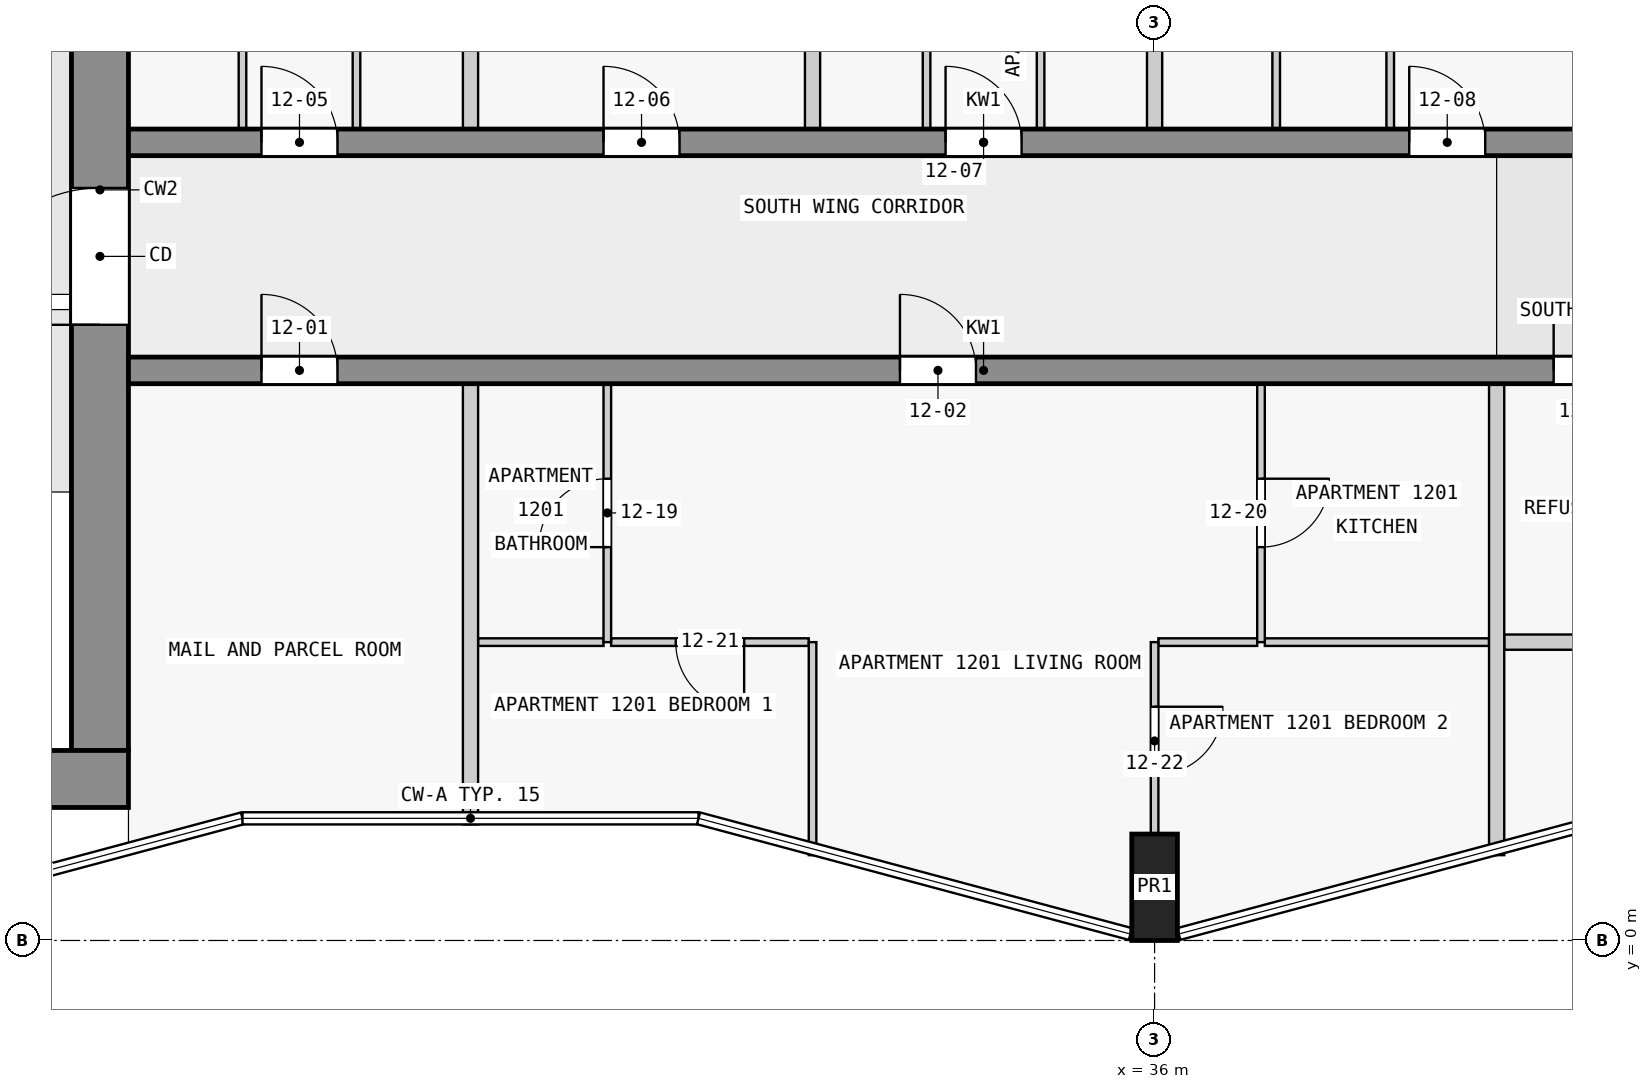
"""IFC4 building model, lengths in metres.
Left out: names, types, materials, properties, quantities, classifications, styles, units other than length and angle.
Written with IfcOpenShell. Run it as: python <this file> out.ifc"""

import sys

from ifc_helpers import new_model, si_unit, direction, frame, frame_2d, origin, origin_2d, place, context, subcontext, project, spatial, rectangle, extrude, element, fill, save


model = new_model("IFC4")
c1 = context("Model", 3, precision=1e-05, world=origin(), true_north=direction((0.0, 1.0)))
c2 = subcontext(c1, "Body", "Model", "MODEL_VIEW")
j1 = project(units=[si_unit("LENGTHUNIT", "METRE"), si_unit("PLANEANGLEUNIT", "RADIAN")], contexts=[c1])
p1 = place(None, origin())
s1 = spatial("IfcSite", under=j1, at=p1, CompositionType="ELEMENT")
p2 = place(p1, origin())
s2 = spatial("IfcBuilding", under=s1, at=p2, CompositionType="ELEMENT")
p3 = place(p2, frame((0.0, 0.0, 51.3)))
s3 = spatial("IfcBuildingStorey", under=s2, at=p3, CompositionType="ELEMENT", Elevation=51.3)
p4 = place(p3, frame((36.0, 0.7, 0.0), z_axis=(0.0, 0.0, 1.0), x_axis=(1.0, 0.0, 0.0)))
e1 = element("IfcColumn", 1, at=p4, inside=s3, PredefinedType="COLUMN", context=c2, shape_type="SweptSolid", body=[
    extrude(rectangle(XDim=0.6, YDim=1.4, at=origin_2d()), origin(), (0.0, 0.0, 1.0), 3.5),
])
p5 = place(p3, frame((1.55, 2.125, 0.0), z_axis=(0.0, 0.0, 1.0), x_axis=(1.0, 0.0, 0.0)))
e2 = element("IfcWall", 2, at=p5, inside=s3, PredefinedType="SHEAR", context=c2, shape_type="SweptSolid", body=[
    extrude(rectangle(XDim=20.95, YDim=0.75, at=frame_2d((10.475, 0.0))), origin(), (0.0, 0.0, 1.0), 3.25),
])
p6 = place(p3, frame((22.125, 2.5, 0.0), z_axis=(0.0, 0.0, 1.0), x_axis=(0.0, 1.0, 0.0)))
e3 = element("IfcWall", 3, at=p6, inside=s3, PredefinedType="SHEAR", context=c2, shape_type="SweptSolid", body=[
    extrude(rectangle(XDim=14.75, YDim=0.75, at=frame_2d((7.375, 0.0))), origin(), (0.0, 0.0, 1.0), 3.25),
])
p7 = place(p6, frame((5.6, 0.0, 0.0)))
e4 = element("IfcOpeningElement", 4, at=p7, cuts=e3, PredefinedType="OPENING", context=c2, shape_type="SweptSolid", body=[
    extrude(rectangle(XDim=1.8, YDim=2.1, at=frame_2d((0.9, 1.05))), frame((0.0, 0.385, 0.0), z_axis=(0.0, -1.0, 0.0), x_axis=(1.0, 0.0, 0.0)), (0.0, 0.0, 1.0), 0.77),
])
p8 = place(p3, frame((22.5, 7.5, 0.0), z_axis=(0.0, 0.0, 1.0), x_axis=(1.0, 0.0, 0.0)))
e5 = element("IfcWall", 5, at=p8, inside=s3, PredefinedType="SHEAR", context=c2, shape_type="SweptSolid", body=[
    extrude(rectangle(XDim=22.5, YDim=0.35, at=frame_2d((11.25, 0.0))), origin(), (0.0, 0.0, 1.0), 3.25),
])
p9 = place(p8, frame((1.75, 0.0, 0.0)))
e6 = element("IfcOpeningElement", 6, at=p9, cuts=e5, PredefinedType="OPENING", context=c2, shape_type="SweptSolid", body=[
    extrude(rectangle(XDim=1.0, YDim=2.1, at=frame_2d((0.5, 1.05))), frame((0.0, 0.185, 0.0), z_axis=(0.0, -1.0, 0.0), x_axis=(1.0, 0.0, 0.0)), (0.0, 0.0, 1.0), 0.37),
])
p10 = place(p8, frame((10.15, 0.0, 0.0)))
e7 = element("IfcOpeningElement", 7, at=p10, cuts=e5, PredefinedType="OPENING", context=c2, shape_type="SweptSolid", body=[
    extrude(rectangle(XDim=1.0, YDim=2.1, at=frame_2d((0.5, 1.05))), frame((0.0, 0.185, 0.0), z_axis=(0.0, -1.0, 0.0), x_axis=(1.0, 0.0, 0.0)), (0.0, 0.0, 1.0), 0.37),
])
p11 = place(p8, frame((18.75, 0.0, 0.0)))
e8 = element("IfcOpeningElement", 8, at=p11, cuts=e5, PredefinedType="OPENING", context=c2, shape_type="SweptSolid", body=[
    extrude(rectangle(XDim=0.9, YDim=2.1, at=frame_2d((0.45, 1.05))), frame((0.0, 0.185, 0.0), z_axis=(0.0, -1.0, 0.0), x_axis=(1.0, 0.0, 0.0)), (0.0, 0.0, 1.0), 0.37),
])
p12 = place(p8, frame((20.95, 0.0, 0.0)))
e9 = element("IfcOpeningElement", 9, at=p12, cuts=e5, PredefinedType="OPENING", context=c2, shape_type="SweptSolid", body=[
    extrude(rectangle(XDim=1.0, YDim=2.1, at=frame_2d((0.5, 1.05))), frame((0.0, 0.185, 0.0), z_axis=(0.0, -1.0, 0.0), x_axis=(1.0, 0.0, 0.0)), (0.0, 0.0, 1.0), 0.37),
])
p13 = place(p3, frame((22.5, 10.5, 0.0), z_axis=(0.0, 0.0, 1.0), x_axis=(1.0, 0.0, 0.0)))
e10 = element("IfcWall", 10, at=p13, inside=s3, PredefinedType="SHEAR", context=c2, shape_type="SweptSolid", body=[
    extrude(rectangle(XDim=22.5, YDim=0.35, at=frame_2d((11.25, 0.0))), origin(), (0.0, 0.0, 1.0), 3.25),
])
p14 = place(p13, frame((1.75, 0.0, 0.0)))
e11 = element("IfcOpeningElement", 11, at=p14, cuts=e10, PredefinedType="OPENING", context=c2, shape_type="SweptSolid", body=[
    extrude(rectangle(XDim=1.0, YDim=2.1, at=frame_2d((0.5, 1.05))), frame((0.0, 0.185, 0.0), z_axis=(0.0, -1.0, 0.0), x_axis=(1.0, 0.0, 0.0)), (0.0, 0.0, 1.0), 0.37),
])
p15 = place(p13, frame((6.25, 0.0, 0.0)))
e12 = element("IfcOpeningElement", 12, at=p15, cuts=e10, PredefinedType="OPENING", context=c2, shape_type="SweptSolid", body=[
    extrude(rectangle(XDim=1.0, YDim=2.1, at=frame_2d((0.5, 1.05))), frame((0.0, 0.185, 0.0), z_axis=(0.0, -1.0, 0.0), x_axis=(1.0, 0.0, 0.0)), (0.0, 0.0, 1.0), 0.37),
])
p16 = place(p13, frame((10.75, 0.0, 0.0)))
e13 = element("IfcOpeningElement", 13, at=p16, cuts=e10, PredefinedType="OPENING", context=c2, shape_type="SweptSolid", body=[
    extrude(rectangle(XDim=1.0, YDim=2.1, at=frame_2d((0.5, 1.05))), frame((0.0, 0.185, 0.0), z_axis=(0.0, -1.0, 0.0), x_axis=(1.0, 0.0, 0.0)), (0.0, 0.0, 1.0), 0.37),
])
p17 = place(p13, frame((16.85, 0.0, 0.0)))
e14 = element("IfcOpeningElement", 14, at=p17, cuts=e10, PredefinedType="OPENING", context=c2, shape_type="SweptSolid", body=[
    extrude(rectangle(XDim=1.0, YDim=2.1, at=frame_2d((0.5, 1.05))), frame((0.0, 0.185, 0.0), z_axis=(0.0, -1.0, 0.0), x_axis=(1.0, 0.0, 0.0)), (0.0, 0.0, 1.0), 0.37),
])
p18 = place(p3, frame((31.45, 3.925, 0.0), z_axis=(0.0, 0.0, 1.0), x_axis=(-1.0, 0.0, 0.0)))
e15 = element("IfcWall", 15, at=p18, inside=s3, PredefinedType="PARTITIONING", context=c2, shape_type="SweptSolid", body=[
    extrude(rectangle(XDim=2.6, YDim=0.1, at=frame_2d((1.3, 0.0))), origin(), (0.0, 0.0, 1.0), 3.25),
])
p19 = place(p18, frame((0.85, 0.0, 0.0)))
e16 = element("IfcOpeningElement", 16, at=p19, cuts=e15, PredefinedType="OPENING", context=c2, shape_type="SweptSolid", body=[
    extrude(rectangle(XDim=0.9, YDim=2.1, at=frame_2d((0.45, 1.05))), frame((0.0, 0.06, 0.0), z_axis=(0.0, -1.0, 0.0), x_axis=(1.0, 0.0, 0.0)), (0.0, 0.0, 1.0), 0.12),
])
p20 = place(p3, frame((37.35, 3.925, 0.0), z_axis=(0.0, 0.0, 1.0), x_axis=(-1.0, 0.0, 0.0)))
e17 = element("IfcWall", 17, at=p20, inside=s3, PredefinedType="PARTITIONING", context=c2, shape_type="SweptSolid", body=[
    extrude(rectangle(XDim=1.3, YDim=0.1, at=frame_2d((0.65, 0.0))), origin(), (0.0, 0.0, 1.0), 3.25),
])
p21 = place(p3, frame((27.1, 3.925, 0.0), z_axis=(0.0, 0.0, 1.0), x_axis=(1.0, 0.0, 0.0)))
e18 = element("IfcWall", 18, at=p21, inside=s3, PredefinedType="PARTITIONING", context=c2, shape_type="SweptSolid", body=[
    extrude(rectangle(XDim=1.65, YDim=0.1, at=frame_2d((0.825, 0.0))), origin(), (0.0, 0.0, 1.0), 3.25),
])
p22 = place(p3, frame((37.45, 3.925, 0.0), z_axis=(0.0, 0.0, 1.0), x_axis=(1.0, 0.0, 0.0)))
e19 = element("IfcWall", 19, at=p22, inside=s3, PredefinedType="PARTITIONING", context=c2, shape_type="SweptSolid", body=[
    extrude(rectangle(XDim=2.95, YDim=0.1, at=frame_2d((1.475, 0.0))), origin(), (0.0, 0.0, 1.0), 3.25),
])
p23 = place(p3, frame((40.6, 3.925, 0.0), z_axis=(0.0, 0.0, 1.0), x_axis=(1.0, 0.0, 0.0)))
e20 = element("IfcWall", 20, at=p23, inside=s3, PredefinedType="PARTITIONING", context=c2, shape_type="SweptSolid", body=[
    extrude(rectangle(XDim=2.2, YDim=0.2, at=frame_2d((1.1, 0.0))), origin(), (0.0, 0.0, 1.0), 3.25),
])
p24 = place(p3, frame((24.0, 10.675, 0.0), z_axis=(0.0, 0.0, 1.0), x_axis=(0.0, 1.0, 0.0)))
e21 = element("IfcWall", 21, at=p24, inside=s3, PredefinedType="PARTITIONING", context=c2, shape_type="SweptSolid", body=[
    extrude(rectangle(XDim=3.4, YDim=0.1, at=frame_2d((1.7, 0.0))), origin(), (0.0, 0.0, 1.0), 3.25),
])
p25 = place(p24, frame((1.25, 0.0, 0.0)))
e22 = element("IfcOpeningElement", 22, at=p25, cuts=e21, PredefinedType="OPENING", context=c2, shape_type="SweptSolid", body=[
    extrude(rectangle(XDim=0.9, YDim=2.1, at=frame_2d((0.45, 1.05))), frame((0.0, 0.06, 0.0), z_axis=(0.0, -1.0, 0.0), x_axis=(1.0, 0.0, 0.0)), (0.0, 0.0, 1.0), 0.12),
])
p26 = place(p3, frame((25.5, 14.075, 0.0), z_axis=(0.0, 0.0, 1.0), x_axis=(0.0, -1.0, 0.0)))
e23 = element("IfcWall", 23, at=p26, inside=s3, PredefinedType="PARTITIONING", context=c2, shape_type="SweptSolid", body=[
    extrude(rectangle(XDim=3.4, YDim=0.1, at=frame_2d((1.7, 0.0))), origin(), (0.0, 0.0, 1.0), 3.25),
])
p27 = place(p26, frame((1.25, 0.0, 0.0)))
e24 = element("IfcOpeningElement", 24, at=p27, cuts=e23, PredefinedType="OPENING", context=c2, shape_type="SweptSolid", body=[
    extrude(rectangle(XDim=0.9, YDim=2.1, at=frame_2d((0.45, 1.05))), frame((0.0, 0.06, 0.0), z_axis=(0.0, -1.0, 0.0), x_axis=(1.0, 0.0, 0.0)), (0.0, 0.0, 1.0), 0.12),
])
p28 = place(p3, frame((27.0, 1.527, 0.0), z_axis=(0.0, 0.0, 1.0), x_axis=(0.0, 1.0, 0.0)))
e25 = element("IfcWall", 25, at=p28, inside=s3, PredefinedType="PARTITIONING", context=c2, shape_type="SweptSolid", body=[
    extrude(rectangle(XDim=5.798, YDim=0.2, at=frame_2d((2.899, 0.0))), origin(), (0.0, 0.0, 1.0), 3.25),
])
p29 = place(p3, frame((27.0, 10.675, 0.0), z_axis=(0.0, 0.0, 1.0), x_axis=(0.0, 1.0, 0.0)))
e26 = element("IfcWall", 26, at=p29, inside=s3, PredefinedType="PARTITIONING", context=c2, shape_type="SweptSolid", body=[
    extrude(rectangle(XDim=3.4, YDim=0.2, at=frame_2d((1.7, 0.0))), origin(), (0.0, 0.0, 1.0), 3.25),
])
p30 = place(p3, frame((28.8, 3.925, 0.0), z_axis=(0.0, 0.0, 1.0), x_axis=(0.0, 1.0, 0.0)))
e27 = element("IfcWall", 27, at=p30, inside=s3, PredefinedType="PARTITIONING", context=c2, shape_type="SweptSolid", body=[
    extrude(rectangle(XDim=3.4, YDim=0.1, at=frame_2d((1.7, 0.0))), origin(), (0.0, 0.0, 1.0), 3.25),
])
p31 = place(p30, frame((1.25, 0.0, 0.0)))
e28 = element("IfcOpeningElement", 28, at=p31, cuts=e27, PredefinedType="OPENING", context=c2, shape_type="SweptSolid", body=[
    extrude(rectangle(XDim=0.9, YDim=2.1, at=frame_2d((0.45, 1.05))), frame((0.0, 0.06, 0.0), z_axis=(0.0, -1.0, 0.0), x_axis=(1.0, 0.0, 0.0)), (0.0, 0.0, 1.0), 0.12),
])
p32 = place(p3, frame((31.5, 1.122, 0.0), z_axis=(0.0, 0.0, 1.0), x_axis=(0.0, 1.0, 0.0)))
e29 = element("IfcWall", 29, at=p32, inside=s3, PredefinedType="PARTITIONING", context=c2, shape_type="SweptSolid", body=[
    extrude(rectangle(XDim=2.803, YDim=0.1, at=frame_2d((1.401, 0.0))), origin(), (0.0, 0.0, 1.0), 3.25),
])
p33 = place(p3, frame((31.5, 10.675, 0.0), z_axis=(0.0, 0.0, 1.0), x_axis=(0.0, 1.0, 0.0)))
e30 = element("IfcWall", 30, at=p33, inside=s3, PredefinedType="PARTITIONING", context=c2, shape_type="SweptSolid", body=[
    extrude(rectangle(XDim=6.203, YDim=0.2, at=frame_2d((3.101, 0.0))), origin(), (0.0, 0.0, 1.0), 3.25),
])
p34 = place(p3, frame((33.0, 10.675, 0.0), z_axis=(0.0, 0.0, 1.0), x_axis=(0.0, 1.0, 0.0)))
e31 = element("IfcWall", 31, at=p34, inside=s3, PredefinedType="PARTITIONING", context=c2, shape_type="SweptSolid", body=[
    extrude(rectangle(XDim=3.4, YDim=0.1, at=frame_2d((1.7, 0.0))), origin(), (0.0, 0.0, 1.0), 3.25),
])
p35 = place(p34, frame((1.25, 0.0, 0.0)))
e32 = element("IfcOpeningElement", 32, at=p35, cuts=e31, PredefinedType="OPENING", context=c2, shape_type="SweptSolid", body=[
    extrude(rectangle(XDim=0.9, YDim=2.1, at=frame_2d((0.45, 1.05))), frame((0.0, 0.06, 0.0), z_axis=(0.0, -1.0, 0.0), x_axis=(1.0, 0.0, 0.0)), (0.0, 0.0, 1.0), 0.12),
])
p36 = place(p3, frame((34.5, 14.025, 0.0), z_axis=(0.0, 0.0, 1.0), x_axis=(0.0, -1.0, 0.0)))
e33 = element("IfcWall", 33, at=p36, inside=s3, PredefinedType="PARTITIONING", context=c2, shape_type="SweptSolid", body=[
    extrude(rectangle(XDim=3.35, YDim=0.1, at=frame_2d((1.675, 0.0))), origin(), (0.0, 0.0, 1.0), 3.25),
])
p37 = place(p36, frame((1.25, 0.0, 0.0)))
e34 = element("IfcOpeningElement", 34, at=p37, cuts=e33, PredefinedType="OPENING", context=c2, shape_type="SweptSolid", body=[
    extrude(rectangle(XDim=0.9, YDim=2.1, at=frame_2d((0.45, 1.05))), frame((0.0, 0.06, 0.0), z_axis=(0.0, -1.0, 0.0), x_axis=(1.0, 0.0, 0.0)), (0.0, 0.0, 1.0), 0.12),
])
p38 = place(p3, frame((36.0, 3.925, 0.0), z_axis=(0.0, 0.0, 1.0), x_axis=(0.0, -1.0, 0.0)))
e35 = element("IfcWall", 35, at=p38, inside=s3, PredefinedType="PARTITIONING", context=c2, shape_type="SweptSolid", body=[
    extrude(rectangle(XDim=2.525, YDim=0.1, at=frame_2d((1.263, 0.0))), origin(), (0.0, 0.0, 1.0), 3.25),
])
p39 = place(p38, frame((0.85, 0.0, 0.0)))
e36 = element("IfcOpeningElement", 36, at=p39, cuts=e35, PredefinedType="OPENING", context=c2, shape_type="SweptSolid", body=[
    extrude(rectangle(XDim=0.9, YDim=2.1, at=frame_2d((0.45, 1.05))), frame((0.0, 0.06, 0.0), z_axis=(0.0, -1.0, 0.0), x_axis=(1.0, 0.0, 0.0)), (0.0, 0.0, 1.0), 0.12),
])
p40 = place(p3, frame((36.0, 10.675, 0.0), z_axis=(0.0, 0.0, 1.0), x_axis=(0.0, 1.0, 0.0)))
e37 = element("IfcWall", 37, at=p40, inside=s3, PredefinedType="PARTITIONING", context=c2, shape_type="SweptSolid", body=[
    extrude(rectangle(XDim=3.4, YDim=0.2, at=frame_2d((1.7, 0.0))), origin(), (0.0, 0.0, 1.0), 3.25),
])
p41 = place(p3, frame((37.4, 7.325, 0.0), z_axis=(0.0, 0.0, 1.0), x_axis=(0.0, -1.0, 0.0)))
e38 = element("IfcWall", 38, at=p41, inside=s3, PredefinedType="PARTITIONING", context=c2, shape_type="SweptSolid", body=[
    extrude(rectangle(XDim=3.4, YDim=0.1, at=frame_2d((1.7, 0.0))), origin(), (0.0, 0.0, 1.0), 3.25),
])
p42 = place(p41, frame((1.25, 0.0, 0.0)))
e39 = element("IfcOpeningElement", 39, at=p42, cuts=e38, PredefinedType="OPENING", context=c2, shape_type="SweptSolid", body=[
    extrude(rectangle(XDim=0.9, YDim=2.1, at=frame_2d((0.45, 1.05))), frame((0.0, 0.06, 0.0), z_axis=(0.0, -1.0, 0.0), x_axis=(1.0, 0.0, 0.0)), (0.0, 0.0, 1.0), 0.12),
])
p43 = place(p3, frame((37.6, 10.675, 0.0), z_axis=(0.0, 0.0, 1.0), x_axis=(0.0, 1.0, 0.0)))
e40 = element("IfcWall", 40, at=p43, inside=s3, PredefinedType="PARTITIONING", context=c2, shape_type="SweptSolid", body=[
    extrude(rectangle(XDim=3.35, YDim=0.1, at=frame_2d((1.675, 0.0))), origin(), (0.0, 0.0, 1.0), 3.25),
])
p44 = place(p3, frame((39.1, 10.675, 0.0), z_axis=(0.0, 0.0, 1.0), x_axis=(0.0, 1.0, 0.0)))
e41 = element("IfcWall", 41, at=p44, inside=s3, PredefinedType="PARTITIONING", context=c2, shape_type="SweptSolid", body=[
    extrude(rectangle(XDim=3.35, YDim=0.1, at=frame_2d((1.675, 0.0))), origin(), (0.0, 0.0, 1.0), 3.25),
])
p45 = place(p44, frame((1.25, 0.0, 0.0)))
e42 = element("IfcOpeningElement", 42, at=p45, cuts=e41, PredefinedType="OPENING", context=c2, shape_type="SweptSolid", body=[
    extrude(rectangle(XDim=0.9, YDim=2.1, at=frame_2d((0.45, 1.05))), frame((0.0, 0.06, 0.0), z_axis=(0.0, -1.0, 0.0), x_axis=(1.0, 0.0, 0.0)), (0.0, 0.0, 1.0), 0.12),
])
p46 = place(p3, frame((40.5, 1.122, 0.0), z_axis=(0.0, 0.0, 1.0), x_axis=(0.0, 1.0, 0.0)))
e43 = element("IfcWall", 43, at=p46, inside=s3, PredefinedType="PARTITIONING", context=c2, shape_type="SweptSolid", body=[
    extrude(rectangle(XDim=6.203, YDim=0.2, at=frame_2d((3.101, 0.0))), origin(), (0.0, 0.0, 1.0), 3.25),
])
p47 = place(p7, origin())
e44 = element("IfcDoor", 44, at=p47, inside=s3, OperationType="DOUBLE_DOOR_SINGLE_SWING", PredefinedType="DOOR", context=c2, shape_type="SweptSolid", body=[
    extrude(rectangle(XDim=1.8, YDim=2.1, at=frame_2d((0.9, 1.05))), frame((0.0, 0.025, 0.0), z_axis=(0.0, -1.0, 0.0), x_axis=(1.0, 0.0, 0.0)), (0.0, 0.0, 1.0), 0.05),
])
fill(e4, e44)
p48 = place(p9, origin())
e45 = element("IfcDoor", 45, at=p48, inside=s3, OperationType="SINGLE_SWING_LEFT", PredefinedType="DOOR", context=c2, shape_type="SweptSolid", body=[
    extrude(rectangle(XDim=1.0, YDim=2.1, at=frame_2d((0.5, 1.05))), frame((0.0, 0.025, 0.0), z_axis=(0.0, -1.0, 0.0), x_axis=(1.0, 0.0, 0.0)), (0.0, 0.0, 1.0), 0.05),
])
fill(e6, e45)
p49 = place(p10, origin())
e46 = element("IfcDoor", 46, at=p49, inside=s3, OperationType="SINGLE_SWING_LEFT", PredefinedType="DOOR", context=c2, shape_type="SweptSolid", body=[
    extrude(rectangle(XDim=1.0, YDim=2.1, at=frame_2d((0.5, 1.05))), frame((0.0, 0.025, 0.0), z_axis=(0.0, -1.0, 0.0), x_axis=(1.0, 0.0, 0.0)), (0.0, 0.0, 1.0), 0.05),
])
fill(e7, e46)
p50 = place(p11, origin())
e47 = element("IfcDoor", 47, at=p50, inside=s3, OperationType="SINGLE_SWING_RIGHT", PredefinedType="DOOR", context=c2, shape_type="SweptSolid", body=[
    extrude(rectangle(XDim=0.9, YDim=2.1, at=frame_2d((0.45, 1.05))), frame((0.0, 0.025, 0.0), z_axis=(0.0, -1.0, 0.0), x_axis=(1.0, 0.0, 0.0)), (0.0, 0.0, 1.0), 0.05),
])
fill(e8, e47)
p51 = place(p14, origin())
e48 = element("IfcDoor", 48, at=p51, inside=s3, OperationType="SINGLE_SWING_LEFT", PredefinedType="DOOR", context=c2, shape_type="SweptSolid", body=[
    extrude(rectangle(XDim=1.0, YDim=2.1, at=frame_2d((0.5, 1.05))), frame((0.0, 0.025, 0.0), z_axis=(0.0, -1.0, 0.0), x_axis=(1.0, 0.0, 0.0)), (0.0, 0.0, 1.0), 0.05),
])
fill(e11, e48)
p52 = place(p15, origin())
e49 = element("IfcDoor", 49, at=p52, inside=s3, OperationType="SINGLE_SWING_LEFT", PredefinedType="DOOR", context=c2, shape_type="SweptSolid", body=[
    extrude(rectangle(XDim=1.0, YDim=2.1, at=frame_2d((0.5, 1.05))), frame((0.0, 0.025, 0.0), z_axis=(0.0, -1.0, 0.0), x_axis=(1.0, 0.0, 0.0)), (0.0, 0.0, 1.0), 0.05),
])
fill(e12, e49)
p53 = place(p16, origin())
e50 = element("IfcDoor", 50, at=p53, inside=s3, OperationType="SINGLE_SWING_LEFT", PredefinedType="DOOR", context=c2, shape_type="SweptSolid", body=[
    extrude(rectangle(XDim=1.0, YDim=2.1, at=frame_2d((0.5, 1.05))), frame((0.0, 0.025, 0.0), z_axis=(0.0, -1.0, 0.0), x_axis=(1.0, 0.0, 0.0)), (0.0, 0.0, 1.0), 0.05),
])
fill(e13, e50)
p54 = place(p17, origin())
e51 = element("IfcDoor", 51, at=p54, inside=s3, OperationType="SINGLE_SWING_RIGHT", PredefinedType="DOOR", context=c2, shape_type="SweptSolid", body=[
    extrude(rectangle(XDim=1.0, YDim=2.1, at=frame_2d((0.5, 1.05))), frame((0.0, 0.025, 0.0), z_axis=(0.0, -1.0, 0.0), x_axis=(1.0, 0.0, 0.0)), (0.0, 0.0, 1.0), 0.05),
])
fill(e14, e51)
p55 = place(p31, origin())
e52 = element("IfcDoor", 52, at=p55, inside=s3, OperationType="SINGLE_SWING_LEFT", PredefinedType="DOOR", context=c2, shape_type="SweptSolid", body=[
    extrude(rectangle(XDim=0.9, YDim=2.1, at=frame_2d((0.45, 1.05))), frame((0.0, 0.025, 0.0), z_axis=(0.0, -1.0, 0.0), x_axis=(1.0, 0.0, 0.0)), (0.0, 0.0, 1.0), 0.05),
])
fill(e28, e52)
p56 = place(p42, origin())
e53 = element("IfcDoor", 53, at=p56, inside=s3, OperationType="SINGLE_SWING_LEFT", PredefinedType="DOOR", context=c2, shape_type="SweptSolid", body=[
    extrude(rectangle(XDim=0.9, YDim=2.1, at=frame_2d((0.45, 1.05))), frame((0.0, 0.025, 0.0), z_axis=(0.0, -1.0, 0.0), x_axis=(1.0, 0.0, 0.0)), (0.0, 0.0, 1.0), 0.05),
])
fill(e39, e53)
p57 = place(p19, origin())
e54 = element("IfcDoor", 54, at=p57, inside=s3, OperationType="SINGLE_SWING_RIGHT", PredefinedType="DOOR", context=c2, shape_type="SweptSolid", body=[
    extrude(rectangle(XDim=0.9, YDim=2.1, at=frame_2d((0.45, 1.05))), frame((0.0, 0.025, 0.0), z_axis=(0.0, -1.0, 0.0), x_axis=(1.0, 0.0, 0.0)), (0.0, 0.0, 1.0), 0.05),
])
fill(e16, e54)
p58 = place(p39, origin())
e55 = element("IfcDoor", 55, at=p58, inside=s3, OperationType="SINGLE_SWING_RIGHT", PredefinedType="DOOR", context=c2, shape_type="SweptSolid", body=[
    extrude(rectangle(XDim=0.9, YDim=2.1, at=frame_2d((0.45, 1.05))), frame((0.0, 0.025, 0.0), z_axis=(0.0, -1.0, 0.0), x_axis=(1.0, 0.0, 0.0)), (0.0, 0.0, 1.0), 0.05),
])
fill(e36, e55)
save(model, sys.argv[1])
